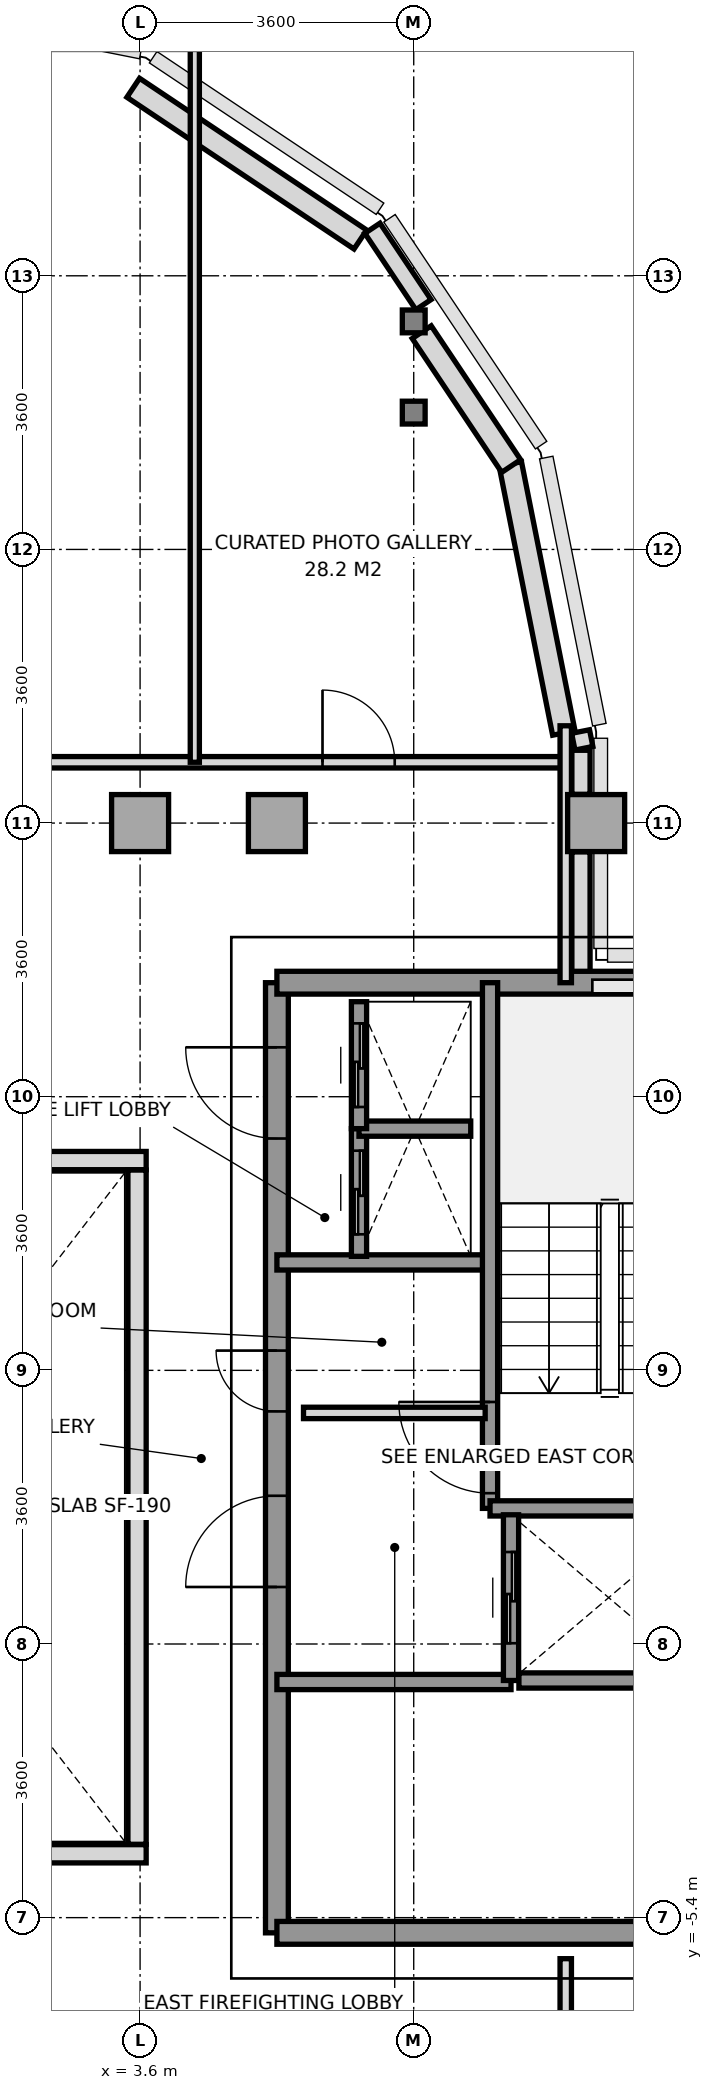
"""IFC4 building model, lengths in metres.
Left out: names, types, materials, properties, quantities, classifications, styles, units other than length and angle.
Written with IfcOpenShell. Run it as: python <this file> out.ifc"""

import sys

from ifc_helpers import new_model, si_unit, direction, frame, frame_2d, origin, origin_2d, place, context, subcontext, project, spatial, rectangle, i_section, extrude, source, transform, mapped, element, fill, save


model = new_model("IFC4")
c1 = context("Model", 3, precision=1e-05, world=origin(), true_north=direction((0.0, 1.0)))
c2 = subcontext(c1, "Body", "Model", "MODEL_VIEW")
j1 = project(units=[si_unit("LENGTHUNIT", "METRE"), si_unit("PLANEANGLEUNIT", "RADIAN")], contexts=[c1])
p1 = place(None, origin())
s1 = spatial("IfcSite", under=j1, at=p1, CompositionType="ELEMENT")
p2 = place(p1, origin())
s2 = spatial("IfcBuilding", under=s1, at=p2, CompositionType="ELEMENT")
p3 = place(p2, frame((0.0, 0.0, 246.0)))
s3 = spatial("IfcBuildingStorey", under=s2, at=p3, CompositionType="ELEMENT", Elevation=246.0)
m1 = source(origin(), c2, "Body", "SweptSolid", [
    extrude(rectangle(XDim=0.75, YDim=0.75, at=origin_2d()), origin(), (0.0, 0.0, 1.0), 3.01),
])
for number, where, z_axis, x_axis in (
    (1, (3.6, 9.0, 0.0), (0.0, 0.0, 1.0), (1.0, 0.0, 0.0)),
    (2, (5.4, 9.0, 0.0), (0.0, 0.0, 1.0), (1.0, 0.0, 0.0)),
):
    element("IfcColumn", number, at=place(p3, frame(where, z_axis=z_axis, x_axis=x_axis)), inside=s3, PredefinedType="COLUMN", context=c2, shape_type="MappedRepresentation", body=[
        mapped(m1, transform((0.0, 0.0, 0.0), x_axis=(1.0, 0.0, 0.0), y_axis=(0.0, 1.0, 0.0), z_axis=(0.0, 0.0, 1.0), scale=1.0)),
    ])
m2 = source(origin(), c2, "Body", "SweptSolid", [
    extrude(i_section(OverallWidth=0.3, OverallDepth=0.3, WebThickness=0.011, FlangeThickness=0.019, at=origin_2d()), origin(), (0.0, 0.0, 1.0), 3.01),
])
for number, where, z_axis, x_axis in (
    (3, (7.2, 14.4, 0.0), (0.0, 0.0, 1.0), (1.0, 0.0, 0.0)),
    (4, (7.2, 15.6, 0.0), (0.0, 0.0, 1.0), (1.0, 0.0, 0.0)),
):
    element("IfcColumn", number, at=place(p3, frame(where, z_axis=z_axis, x_axis=x_axis)), inside=s3, PredefinedType="COLUMN", context=c2, shape_type="MappedRepresentation", body=[
        mapped(m2, transform((0.0, 0.0, 0.0), x_axis=(1.0, 0.0, 0.0), y_axis=(0.0, 1.0, 0.0), z_axis=(0.0, 0.0, 1.0), scale=1.0)),
    ])
p4 = place(p3, frame((9.6, 9.0, 0.0), z_axis=(0.0, 0.0, 1.0), x_axis=(1.0, 0.0, 0.0)))
e5 = element("IfcColumn", 5, at=p4, inside=s3, PredefinedType="COLUMN", context=c2, shape_type="MappedRepresentation", body=[
    mapped(m1, transform((0.0, 0.0, 0.0), x_axis=(1.0, 0.0, 0.0), y_axis=(0.0, 1.0, 0.0), z_axis=(0.0, 0.0, 1.0), scale=1.0)),
])
p5 = place(p3, frame((9.175, 10.185, 0.0), z_axis=(0.0, 0.0, 1.0), x_axis=(-0.195114232679, 0.980780523974, 0.0)))
e6 = element("IfcWall", 6, at=p5, inside=s3, PredefinedType="SOLIDWALL", context=c2, shape_type="SweptSolid", body=[
    extrude(rectangle(XDim=3.609, YDim=0.3, at=frame_2d((1.804, 0.0))), origin(), (0.0, 0.0, 1.0), 3.01),
])
p6 = place(p3, frame((8.482, 13.698, 0.0), z_axis=(0.0, 0.0, 1.0), x_axis=(-0.555604299396, 0.831446848868, 0.0)))
e7 = element("IfcWall", 7, at=p6, inside=s3, PredefinedType="SOLIDWALL", context=c2, shape_type="SweptSolid", body=[
    extrude(rectangle(XDim=2.118, YDim=0.3, at=frame_2d((1.059, 0.0))), origin(), (0.0, 0.0, 1.0), 2.61),
])
p7 = place(p3, frame((6.498, 16.677, 0.0), z_axis=(0.0, 0.0, 1.0), x_axis=(-0.831443568068, 0.555609208993, 0.0)))
e8 = element("IfcWall", 8, at=p7, inside=s3, PredefinedType="SOLIDWALL", context=c2, shape_type="SweptSolid", body=[
    extrude(rectangle(XDim=3.594, YDim=0.3, at=frame_2d((1.797, 0.0))), origin(), (0.0, 0.0, 1.0), 3.01),
])
p8 = place(p3, frame((6.656, 16.825, 0.0), z_axis=(0.0, 0.0, 1.0), x_axis=(0.555585388542, -0.831459485506, 0.0)))
e9 = element("IfcWall", 9, at=p8, inside=s3, PredefinedType="PARAPET", context=c2, shape_type="SweptSolid", body=[
    extrude(rectangle(XDim=1.209, YDim=0.24, at=frame_2d((0.604, 0.0))), origin(), (0.0, 0.0, 1.0), 1.15),
])
p9 = place(p3, frame((9.395, 10.204, 0.0), z_axis=(0.0, 0.0, 1.0), x_axis=(0.194859894132, -0.980831087221, 0.0)))
e10 = element("IfcWall", 10, at=p9, inside=s3, PredefinedType="PARAPET", context=c2, shape_type="SweptSolid", body=[
    extrude(rectangle(XDim=0.224, YDim=0.24, at=frame_2d((0.112, 0.0))), origin(), (0.0, 0.0, 1.0), 1.15),
])
p10 = place(p3, frame((9.4, 9.958, 0.0), z_axis=(0.0, 0.0, 1.0), x_axis=(0.0, -1.0, 0.0)))
e11 = element("IfcWall", 11, at=p10, inside=s3, PredefinedType="PARAPET", context=c2, shape_type="SweptSolid", body=[
    extrude(rectangle(XDim=0.58, YDim=0.24, at=frame_2d((0.29, 0.0))), origin(), (0.0, 0.0, 1.0), 1.15),
])
p11 = place(p3, frame((9.4, 8.622, 0.0), z_axis=(0.0, 0.0, 1.0), x_axis=(0.0, -1.0, 0.0)))
e12 = element("IfcWall", 12, at=p11, inside=s3, PredefinedType="PARAPET", context=c2, shape_type="SweptSolid", body=[
    extrude(rectangle(XDim=1.669, YDim=0.24, at=frame_2d((0.834, 0.0))), origin(), (0.0, 0.0, 1.0), 1.15),
])
p12 = place(p3, frame((5.4, -5.6, 0.0), z_axis=(0.0, 0.0, 1.0), x_axis=(0.0, 1.0, 0.0)))
e13 = element("IfcWall", 13, at=p12, inside=s3, PredefinedType="SHEAR", context=c2, shape_type="SweptSolid", body=[
    extrude(rectangle(XDim=12.5, YDim=0.3, at=frame_2d((6.25, 0.0))), origin(), (0.0, 0.0, 1.0), 3.01),
])
p13 = place(p12, frame((4.55, 0.0, 0.0)))
e14 = element("IfcOpeningElement", 14, at=p13, cuts=e13, PredefinedType="OPENING", context=c2, shape_type="SweptSolid", body=[
    extrude(rectangle(XDim=1.2, YDim=2.2, at=frame_2d((0.6, 1.1))), frame((0.0, 0.16, 0.0), z_axis=(0.0, -1.0, 0.0), x_axis=(1.0, 0.0, 0.0)), (0.0, 0.0, 1.0), 0.32),
])
p14 = place(p12, frame((10.45, 0.0, 0.0)))
e15 = element("IfcOpeningElement", 15, at=p14, cuts=e13, PredefinedType="OPENING", context=c2, shape_type="SweptSolid", body=[
    extrude(rectangle(XDim=1.2, YDim=2.2, at=frame_2d((0.6, 1.1))), frame((0.0, 0.16, 0.0), z_axis=(0.0, -1.0, 0.0), x_axis=(1.0, 0.0, 0.0)), (0.0, 0.0, 1.0), 0.32),
])
p15 = place(p12, frame((6.86, 0.0, 0.0)))
e16 = element("IfcOpeningElement", 16, at=p15, cuts=e13, PredefinedType="OPENING", context=c2, shape_type="SweptSolid", body=[
    extrude(rectangle(XDim=0.8, YDim=2.1, at=frame_2d((0.4, 1.05))), frame((0.0, 0.16, 0.0), z_axis=(0.0, -1.0, 0.0), x_axis=(1.0, 0.0, 0.0)), (0.0, 0.0, 1.0), 0.32),
])
p16 = place(p3, frame((5.4, 6.9, 0.0), z_axis=(0.0, 0.0, 1.0), x_axis=(1.0, 0.0, 0.0)))
e17 = element("IfcWall", 17, at=p16, inside=s3, PredefinedType="SHEAR", context=c2, shape_type="SweptSolid", body=[
    extrude(rectangle(XDim=5.956, YDim=0.3, at=frame_2d((2.978, 0.0))), origin(), (0.0, 0.0, 1.0), 3.01),
])
p17 = place(p3, frame((5.4, -5.6, 0.0), z_axis=(0.0, 0.0, 1.0), x_axis=(1.0, 0.0, 0.0)))
e18 = element("IfcWall", 18, at=p17, inside=s3, PredefinedType="SHEAR", context=c2, shape_type="SweptSolid", body=[
    extrude(rectangle(XDim=7.8, YDim=0.3, at=frame_2d((3.9, 0.0))), origin(), (0.0, 0.0, 1.0), 3.01),
])
p18 = place(p3, frame((5.4, 3.22, 0.0), z_axis=(0.0, 0.0, 1.0), x_axis=(1.0, 0.0, 0.0)))
e19 = element("IfcWall", 19, at=p18, inside=s3, PredefinedType="SOLIDWALL", context=c2, shape_type="SweptSolid", body=[
    extrude(rectangle(XDim=2.78, YDim=0.2, at=frame_2d((1.39, 0.0))), origin(), (0.0, 0.0, 1.0), 3.01),
])
p19 = place(p3, frame((5.4, -2.3, 0.0), z_axis=(0.0, 0.0, 1.0), x_axis=(1.0, 0.0, 0.0)))
e20 = element("IfcWall", 20, at=p19, inside=s3, PredefinedType="SOLIDWALL", context=c2, shape_type="SweptSolid", body=[
    extrude(rectangle(XDim=3.08, YDim=0.2, at=frame_2d((1.54, 0.0))), origin(), (0.0, 0.0, 1.0), 3.01),
])
p20 = place(p3, frame((8.204, -0.016, 0.0), z_axis=(0.0, 0.0, 1.0), x_axis=(0.0, 1.0, 0.0)))
e21 = element("IfcWall", 21, at=p20, inside=s3, PredefinedType="SOLIDWALL", context=c2, shape_type="SweptSolid", body=[
    extrude(rectangle(XDim=6.916, YDim=0.2, at=frame_2d((3.458, 0.0))), origin(), (0.0, 0.0, 1.0), 3.01),
])
p21 = place(p20, frame((0.2, 0.0, 0.0)))
e22 = element("IfcOpeningElement", 22, at=p21, cuts=e21, PredefinedType="OPENING", context=c2, shape_type="SweptSolid", body=[
    extrude(rectangle(XDim=1.2, YDim=2.2, at=frame_2d((0.6, 1.1))), frame((0.0, 0.11, 0.0), z_axis=(0.0, -1.0, 0.0), x_axis=(1.0, 0.0, 0.0)), (0.0, 0.0, 1.0), 0.22),
])
p22 = place(p3, frame((8.204, -0.016, 0.0), z_axis=(0.0, 0.0, 1.0), x_axis=(1.0, 0.0, 0.0)))
e23 = element("IfcWall", 23, at=p22, inside=s3, PredefinedType="SOLIDWALL", context=c2, shape_type="SweptSolid", body=[
    extrude(rectangle(XDim=3.152, YDim=0.2, at=frame_2d((1.576, 0.0))), origin(), (0.0, 0.0, 1.0), 3.01),
])
p23 = place(p3, frame((8.48, -2.28, 0.0), z_axis=(0.0, 0.0, 1.0), x_axis=(0.0, 1.0, 0.0)))
e24 = element("IfcWall", 24, at=p23, inside=s3, PredefinedType="SOLIDWALL", context=c2, shape_type="SweptSolid", body=[
    extrude(rectangle(XDim=2.18, YDim=0.2, at=frame_2d((1.09, 0.0))), origin(), (0.0, 0.0, 1.0), 3.01),
])
p24 = place(p23, frame((0.49, 0.0, 0.0)))
e25 = element("IfcOpeningElement", 25, at=p24, cuts=e24, PredefinedType="OPENING", context=c2, shape_type="SweptSolid", body=[
    extrude(rectangle(XDim=1.2, YDim=2.2, at=frame_2d((0.6, 1.1))), frame((0.0, 0.11, 0.0), z_axis=(0.0, -1.0, 0.0), x_axis=(1.0, 0.0, 0.0)), (0.0, 0.0, 1.0), 0.22),
])
p25 = place(p3, frame((8.584, -2.28, 0.0), z_axis=(0.0, 0.0, 1.0), x_axis=(1.0, 0.0, 0.0)))
e26 = element("IfcWall", 26, at=p25, inside=s3, PredefinedType="SOLIDWALL", context=c2, shape_type="SweptSolid", body=[
    extrude(rectangle(XDim=2.362, YDim=0.2, at=frame_2d((1.181, 0.0))), origin(), (0.0, 0.0, 1.0), 3.01),
])
p26 = place(p3, frame((6.48, 3.3, 0.0), z_axis=(0.0, 0.0, 1.0), x_axis=(0.0, 1.0, 0.0)))
e27 = element("IfcWall", 27, at=p26, inside=s3, PredefinedType="SOLIDWALL", context=c2, shape_type="SweptSolid", body=[
    extrude(rectangle(XDim=1.68, YDim=0.2, at=frame_2d((0.84, 0.0))), origin(), (0.0, 0.0, 1.0), 3.01),
])
p27 = place(p26, frame((0.29, 0.0, 0.0)))
e28 = element("IfcOpeningElement", 28, at=p27, cuts=e27, PredefinedType="OPENING", context=c2, shape_type="SweptSolid", body=[
    extrude(rectangle(XDim=1.1, YDim=2.2, at=frame_2d((0.55, 1.1))), frame((0.0, 0.11, 0.0), z_axis=(0.0, -1.0, 0.0), x_axis=(1.0, 0.0, 0.0)), (0.0, 0.0, 1.0), 0.22),
])
p28 = place(p3, frame((6.48, 4.98, 0.0), z_axis=(0.0, 0.0, 1.0), x_axis=(1.0, 0.0, 0.0)))
e29 = element("IfcWall", 29, at=p28, inside=s3, PredefinedType="SOLIDWALL", context=c2, shape_type="SweptSolid", body=[
    extrude(rectangle(XDim=1.47, YDim=0.2, at=frame_2d((0.735, 0.0))), origin(), (0.0, 0.0, 1.0), 3.01),
])
p29 = place(p3, frame((6.48, 4.98, 0.0), z_axis=(0.0, 0.0, 1.0), x_axis=(0.0, 1.0, 0.0)))
e30 = element("IfcWall", 30, at=p29, inside=s3, PredefinedType="SOLIDWALL", context=c2, shape_type="SweptSolid", body=[
    extrude(rectangle(XDim=1.67, YDim=0.2, at=frame_2d((0.835, 0.0))), origin(), (0.0, 0.0, 1.0), 3.01),
])
p30 = place(p29, frame((0.285, 0.0, 0.0)))
e31 = element("IfcOpeningElement", 31, at=p30, cuts=e30, PredefinedType="OPENING", context=c2, shape_type="SweptSolid", body=[
    extrude(rectangle(XDim=1.1, YDim=2.2, at=frame_2d((0.55, 1.1))), frame((0.0, 0.11, 0.0), z_axis=(0.0, -1.0, 0.0), x_axis=(1.0, 0.0, 0.0)), (0.0, 0.0, 1.0), 0.22),
])
p31 = place(p3, frame((5.75, 1.24, 0.0), z_axis=(0.0, 0.0, 1.0), x_axis=(1.0, 0.0, 0.0)))
e32 = element("IfcWall", 32, at=p31, inside=s3, PredefinedType="PARTITIONING", context=c2, shape_type="SweptSolid", body=[
    extrude(rectangle(XDim=2.39, YDim=0.15, at=frame_2d((1.195, 0.0))), origin(), (0.0, 0.0, 1.0), 3.01),
])
p32 = place(p3, frame((-9.2, 9.8, 0.0), z_axis=(0.0, 0.0, 1.0), x_axis=(1.0, 0.0, 0.0)))
e33 = element("IfcWall", 33, at=p32, inside=s3, PredefinedType="PARTITIONING", context=c2, shape_type="SweptSolid", body=[
    extrude(rectangle(XDim=18.4, YDim=0.15, at=frame_2d((9.2, 0.0))), origin(), (0.0, 0.0, 1.0), 3.01),
])
p33 = place(p32, frame((2.2, 0.0, 0.0)))
e34 = element("IfcOpeningElement", 34, at=p33, cuts=e33, PredefinedType="OPENING", context=c2, shape_type="SweptSolid", body=[
    extrude(rectangle(XDim=0.95, YDim=2.15, at=frame_2d((0.475, 1.075))), frame((0.0, 0.085, 0.0), z_axis=(0.0, -1.0, 0.0), x_axis=(1.0, 0.0, 0.0)), (0.0, 0.0, 1.0), 0.17),
])
p34 = place(p32, frame((8.8, 0.0, 0.0)))
e35 = element("IfcOpeningElement", 35, at=p34, cuts=e33, PredefinedType="OPENING", context=c2, shape_type="SweptSolid", body=[
    extrude(rectangle(XDim=1.1, YDim=2.2, at=frame_2d((0.55, 1.1))), frame((0.0, 0.085, 0.0), z_axis=(0.0, -1.0, 0.0), x_axis=(1.0, 0.0, 0.0)), (0.0, 0.0, 1.0), 0.17),
])
p35 = place(p32, frame((15.2, 0.0, 0.0)))
e36 = element("IfcOpeningElement", 36, at=p35, cuts=e33, PredefinedType="OPENING", context=c2, shape_type="SweptSolid", body=[
    extrude(rectangle(XDim=0.95, YDim=2.15, at=frame_2d((0.475, 1.075))), frame((0.0, 0.085, 0.0), z_axis=(0.0, -1.0, 0.0), x_axis=(1.0, 0.0, 0.0)), (0.0, 0.0, 1.0), 0.17),
])
p36 = place(p3, frame((9.2, 6.9, 0.0), z_axis=(0.0, 0.0, 1.0), x_axis=(0.0, 1.0, 0.0)))
e37 = element("IfcWall", 37, at=p36, inside=s3, PredefinedType="PARTITIONING", context=c2, shape_type="SweptSolid", body=[
    extrude(rectangle(XDim=3.38, YDim=0.15, at=frame_2d((1.69, 0.0))), origin(), (0.0, 0.0, 1.0), 2.61),
])
p37 = place(p3, frame((4.32, 9.8, 0.0), z_axis=(0.0, 0.0, 1.0), x_axis=(0.0, 1.0, 0.0)))
e38 = element("IfcWall", 38, at=p37, inside=s3, PredefinedType="PARTITIONING", context=c2, shape_type="SweptSolid", body=[
    extrude(rectangle(XDim=9.45, YDim=0.12, at=frame_2d((4.725, 0.0))), origin(), (0.0, 0.0, 1.0), 2.61),
])
p38 = place(p3, frame((9.2, -10.28, 0.0), z_axis=(0.0, 0.0, 1.0), x_axis=(0.0, 1.0, 0.0)))
e39 = element("IfcWall", 39, at=p38, inside=s3, PredefinedType="PARTITIONING", context=c2, shape_type="SweptSolid", body=[
    extrude(rectangle(XDim=4.34, YDim=0.15, at=frame_2d((2.17, 0.0))), origin(), (0.0, 0.0, 1.0), 2.61),
])
for number, where, z_axis, x_axis in (
    (40, (-3.68, -4.56, 0.0), (0.0, 0.0, 1.0), (1.0, 0.0, 0.0)),
    (41, (-3.68, 4.56, 0.0), (0.0, 0.0, 1.0), (1.0, 0.0, 0.0)),
):
    element("IfcWall", number, at=place(p3, frame(where, z_axis=z_axis, x_axis=x_axis)), inside=s3, PredefinedType="PARAPET", context=c2, shape_type="SweptSolid", body=[
        extrude(rectangle(XDim=7.36, YDim=0.24, at=frame_2d((3.68, 0.0))), origin(), (0.0, 0.0, 1.0), 1.15),
    ])
p39 = place(p3, frame((3.56, -4.435, 0.0), z_axis=(0.0, 0.0, 1.0), x_axis=(0.0, 1.0, 0.0)))
e42 = element("IfcWall", 42, at=p39, inside=s3, PredefinedType="PARAPET", context=c2, shape_type="SweptSolid", body=[
    extrude(rectangle(XDim=8.87, YDim=0.24, at=frame_2d((4.435, 0.0))), origin(), (0.0, 0.0, 1.0), 1.15),
])
m3 = source(origin(), c2, "Body", "SweptSolid", [
    extrude(rectangle(XDim=1.2, YDim=2.2, at=frame_2d((0.6, 1.1))), frame((0.0, 0.025, 0.0), z_axis=(0.0, -1.0, 0.0), x_axis=(1.0, 0.0, 0.0)), (0.0, 0.0, 1.0), 0.05),
])
p40 = place(p21, origin())
e43 = element("IfcDoor", 43, at=p40, inside=s3, OperationType="SINGLE_SWING_RIGHT", PredefinedType="DOOR", context=c2, shape_type="MappedRepresentation", body=[
    mapped(m3, transform((0.0, 0.0, 0.0), x_axis=(1.0, 0.0, 0.0), y_axis=(0.0, 1.0, 0.0), z_axis=(0.0, 0.0, 1.0), scale=1.0)),
])
fill(e22, e43)
p41 = place(p13, origin())
e44 = element("IfcDoor", 44, at=p41, inside=s3, OperationType="SINGLE_SWING_LEFT", PredefinedType="DOOR", context=c2, shape_type="MappedRepresentation", body=[
    mapped(m3, transform((0.0, 0.0, 0.0), x_axis=(1.0, 0.0, 0.0), y_axis=(0.0, 1.0, 0.0), z_axis=(0.0, 0.0, 1.0), scale=1.0)),
])
fill(e14, e44)
p42 = place(p14, origin())
e45 = element("IfcDoor", 45, at=p42, inside=s3, OperationType="SINGLE_SWING_RIGHT", PredefinedType="DOOR", context=c2, shape_type="MappedRepresentation", body=[
    mapped(m3, transform((0.0, 0.0, 0.0), x_axis=(1.0, 0.0, 0.0), y_axis=(0.0, 1.0, 0.0), z_axis=(0.0, 0.0, 1.0), scale=1.0)),
])
fill(e15, e45)
m4 = source(origin(), c2, "Body", "SweptSolid", [
    extrude(rectangle(XDim=0.8, YDim=2.1, at=frame_2d((0.4, 1.05))), frame((0.0, 0.025, 0.0), z_axis=(0.0, -1.0, 0.0), x_axis=(1.0, 0.0, 0.0)), (0.0, 0.0, 1.0), 0.05),
])
p43 = place(p15, origin())
e46 = element("IfcDoor", 46, at=p43, inside=s3, OperationType="SINGLE_SWING_RIGHT", PredefinedType="DOOR", context=c2, shape_type="MappedRepresentation", body=[
    mapped(m4, transform((0.0, 0.0, 0.0), x_axis=(1.0, 0.0, 0.0), y_axis=(0.0, 1.0, 0.0), z_axis=(0.0, 0.0, 1.0), scale=1.0)),
])
fill(e16, e46)
p44 = place(p24, origin())
e47 = element("IfcDoor", 47, at=p44, inside=s3, OperationType="SLIDING_TO_RIGHT", PredefinedType="DOOR", context=c2, shape_type="MappedRepresentation", body=[
    mapped(m3, transform((0.0, 0.0, 0.0), x_axis=(1.0, 0.0, 0.0), y_axis=(0.0, 1.0, 0.0), z_axis=(0.0, 0.0, 1.0), scale=1.0)),
])
fill(e25, e47)
m5 = source(origin(), c2, "Body", "SweptSolid", [
    extrude(rectangle(XDim=1.1, YDim=2.2, at=frame_2d((0.55, 1.1))), frame((0.0, 0.025, 0.0), z_axis=(0.0, -1.0, 0.0), x_axis=(1.0, 0.0, 0.0)), (0.0, 0.0, 1.0), 0.05),
])
p45 = place(p27, origin())
e48 = element("IfcDoor", 48, at=p45, inside=s3, OperationType="SLIDING_TO_LEFT", PredefinedType="DOOR", context=c2, shape_type="MappedRepresentation", body=[
    mapped(m5, transform((0.0, 0.0, 0.0), x_axis=(1.0, 0.0, 0.0), y_axis=(0.0, 1.0, 0.0), z_axis=(0.0, 0.0, 1.0), scale=1.0)),
])
fill(e28, e48)
p46 = place(p30, origin())
e49 = element("IfcDoor", 49, at=p46, inside=s3, OperationType="SLIDING_TO_LEFT", PredefinedType="DOOR", context=c2, shape_type="MappedRepresentation", body=[
    mapped(m5, transform((0.0, 0.0, 0.0), x_axis=(1.0, 0.0, 0.0), y_axis=(0.0, 1.0, 0.0), z_axis=(0.0, 0.0, 1.0), scale=1.0)),
])
fill(e31, e49)
m6 = source(origin(), c2, "Body", "SweptSolid", [
    extrude(rectangle(XDim=0.95, YDim=2.15, at=frame_2d((0.475, 1.075))), frame((0.0, 0.025, 0.0), z_axis=(0.0, -1.0, 0.0), x_axis=(1.0, 0.0, 0.0)), (0.0, 0.0, 1.0), 0.05),
])
p47 = place(p35, origin())
e50 = element("IfcDoor", 50, at=p47, inside=s3, OperationType="SINGLE_SWING_LEFT", PredefinedType="DOOR", context=c2, shape_type="MappedRepresentation", body=[
    mapped(m6, transform((0.0, 0.0, 0.0), x_axis=(1.0, 0.0, 0.0), y_axis=(0.0, 1.0, 0.0), z_axis=(0.0, 0.0, 1.0), scale=1.0)),
])
fill(e36, e50)
save(model, sys.argv[1])
